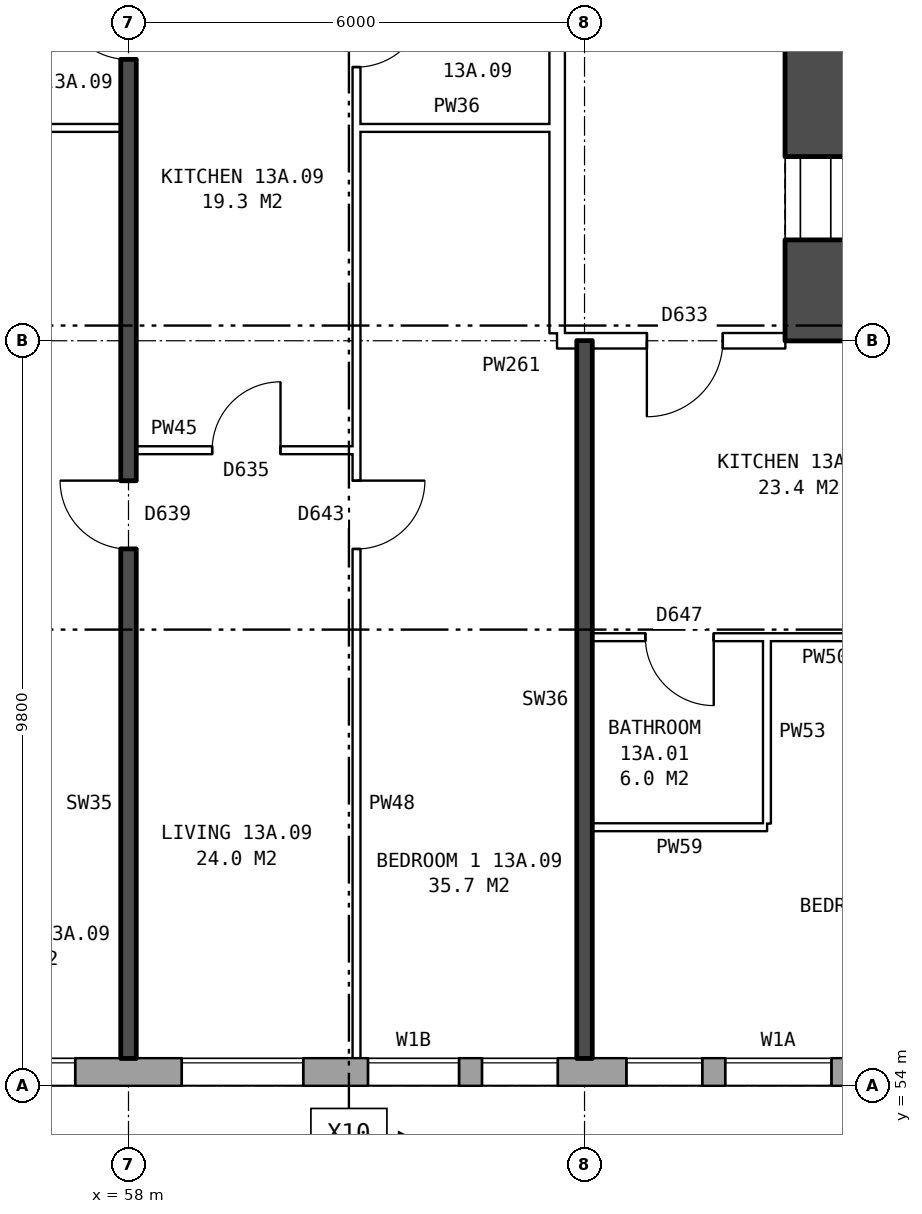
"""IFC4 building model, lengths in metres.
Left out: names, types, materials, properties, quantities, classifications, styles, units other than length and angle.
Written with IfcOpenShell. Run it as: python <this file> out.ifc"""

import sys

from ifc_helpers import new_model, si_unit, direction, frame, frame_2d, origin, place, context, subcontext, project, spatial, rectangle, extrude, element, fill, save


model = new_model("IFC4")
c1 = context("Model", 3, precision=1e-05, world=origin(), true_north=direction((0.0, 1.0)))
c2 = subcontext(c1, "Body", "Model", "MODEL_VIEW")
j1 = project(units=[si_unit("LENGTHUNIT", "METRE"), si_unit("PLANEANGLEUNIT", "RADIAN")], contexts=[c1])
p1 = place(None, origin())
s1 = spatial("IfcSite", under=j1, at=p1, CompositionType="ELEMENT")
p2 = place(p1, origin())
s2 = spatial("IfcBuilding", under=s1, at=p2, CompositionType="ELEMENT")
p3 = place(p2, frame((0.0, 0.0, 50.5)))
s3 = spatial("IfcBuildingStorey", under=s2, at=p3, CompositionType="ELEMENT", Elevation=50.5)
p4 = place(p3, frame((24.575, 54.18, 0.0), z_axis=(0.0, 0.0, 1.0), x_axis=(1.0, 0.0, 0.0)))
e1 = element("IfcWall", 1, at=p4, inside=s3, PredefinedType="STANDARD", context=c2, shape_type="SweptSolid", body=[
    extrude(rectangle(XDim=48.351, YDim=0.36, at=frame_2d((24.175, 0.0))), origin(), (0.0, 0.0, 1.0), 2.85),
])
p5 = place(p4, frame((1.125, 0.0, 0.8)))
e2 = element("IfcOpeningElement", 2, at=p5, cuts=e1, PredefinedType="OPENING", context=c2, shape_type="SweptSolid", body=[
    extrude(rectangle(XDim=1.6, YDim=1.8, at=frame_2d((0.8, 0.9))), frame((0.0, 0.19, 0.0), z_axis=(0.0, -1.0, 0.0), x_axis=(1.0, 0.0, 0.0)), (0.0, 0.0, 1.0), 0.38),
])
p6 = place(p4, frame((4.125, 0.0, 0.8)))
e3 = element("IfcOpeningElement", 3, at=p6, cuts=e1, PredefinedType="OPENING", context=c2, shape_type="SweptSolid", body=[
    extrude(rectangle(XDim=1.6, YDim=1.8, at=frame_2d((0.8, 0.9))), frame((0.0, 0.19, 0.0), z_axis=(0.0, -1.0, 0.0), x_axis=(1.0, 0.0, 0.0)), (0.0, 0.0, 1.0), 0.38),
])
p7 = place(p4, frame((6.025, 0.0, 0.8)))
e4 = element("IfcOpeningElement", 4, at=p7, cuts=e1, PredefinedType="OPENING", context=c2, shape_type="SweptSolid", body=[
    extrude(rectangle(XDim=1.0, YDim=1.8, at=frame_2d((0.5, 0.9))), frame((0.0, 0.19, 0.0), z_axis=(0.0, -1.0, 0.0), x_axis=(1.0, 0.0, 0.0)), (0.0, 0.0, 1.0), 0.38),
])
p8 = place(p4, frame((9.775, 0.0, 0.8)))
e5 = element("IfcOpeningElement", 5, at=p8, cuts=e1, PredefinedType="OPENING", context=c2, shape_type="SweptSolid", body=[
    extrude(rectangle(XDim=1.0, YDim=0.9, at=frame_2d((0.5, 0.45))), frame((0.0, 0.19, 0.0), z_axis=(0.0, -1.0, 0.0), x_axis=(1.0, 0.0, 0.0)), (0.0, 0.0, 1.0), 0.38),
])
p9 = place(p4, frame((13.125, 0.0, 0.8)))
e6 = element("IfcOpeningElement", 6, at=p9, cuts=e1, PredefinedType="OPENING", context=c2, shape_type="SweptSolid", body=[
    extrude(rectangle(XDim=1.6, YDim=1.8, at=frame_2d((0.8, 0.9))), frame((0.0, 0.19, 0.0), z_axis=(0.0, -1.0, 0.0), x_axis=(1.0, 0.0, 0.0)), (0.0, 0.0, 1.0), 0.38),
])
p10 = place(p4, frame((16.125, 0.0, 0.8)))
e7 = element("IfcOpeningElement", 7, at=p10, cuts=e1, PredefinedType="OPENING", context=c2, shape_type="SweptSolid", body=[
    extrude(rectangle(XDim=1.6, YDim=1.8, at=frame_2d((0.8, 0.9))), frame((0.0, 0.19, 0.0), z_axis=(0.0, -1.0, 0.0), x_axis=(1.0, 0.0, 0.0)), (0.0, 0.0, 1.0), 0.38),
])
p11 = place(p4, frame((19.125, 0.0, 0.8)))
e8 = element("IfcOpeningElement", 8, at=p11, cuts=e1, PredefinedType="OPENING", context=c2, shape_type="SweptSolid", body=[
    extrude(rectangle(XDim=1.6, YDim=1.8, at=frame_2d((0.8, 0.9))), frame((0.0, 0.19, 0.0), z_axis=(0.0, -1.0, 0.0), x_axis=(1.0, 0.0, 0.0)), (0.0, 0.0, 1.0), 0.38),
])
p12 = place(p4, frame((22.125, 0.0, 0.8)))
e9 = element("IfcOpeningElement", 9, at=p12, cuts=e1, PredefinedType="OPENING", context=c2, shape_type="SweptSolid", body=[
    extrude(rectangle(XDim=1.6, YDim=1.8, at=frame_2d((0.8, 0.9))), frame((0.0, 0.19, 0.0), z_axis=(0.0, -1.0, 0.0), x_axis=(1.0, 0.0, 0.0)), (0.0, 0.0, 1.0), 0.38),
])
p13 = place(p4, frame((25.125, 0.0, 0.8)))
e10 = element("IfcOpeningElement", 10, at=p13, cuts=e1, PredefinedType="OPENING", context=c2, shape_type="SweptSolid", body=[
    extrude(rectangle(XDim=1.6, YDim=1.8, at=frame_2d((0.8, 0.9))), frame((0.0, 0.19, 0.0), z_axis=(0.0, -1.0, 0.0), x_axis=(1.0, 0.0, 0.0)), (0.0, 0.0, 1.0), 0.38),
])
p14 = place(p4, frame((28.125, 0.0, 0.8)))
e11 = element("IfcOpeningElement", 11, at=p14, cuts=e1, PredefinedType="OPENING", context=c2, shape_type="SweptSolid", body=[
    extrude(rectangle(XDim=1.6, YDim=1.8, at=frame_2d((0.8, 0.9))), frame((0.0, 0.19, 0.0), z_axis=(0.0, -1.0, 0.0), x_axis=(1.0, 0.0, 0.0)), (0.0, 0.0, 1.0), 0.38),
])
p15 = place(p4, frame((31.125, 0.0, 0.8)))
e12 = element("IfcOpeningElement", 12, at=p15, cuts=e1, PredefinedType="OPENING", context=c2, shape_type="SweptSolid", body=[
    extrude(rectangle(XDim=1.6, YDim=1.8, at=frame_2d((0.8, 0.9))), frame((0.0, 0.19, 0.0), z_axis=(0.0, -1.0, 0.0), x_axis=(1.0, 0.0, 0.0)), (0.0, 0.0, 1.0), 0.38),
])
p16 = place(p4, frame((34.125, 0.0, 0.8)))
e13 = element("IfcOpeningElement", 13, at=p16, cuts=e1, PredefinedType="OPENING", context=c2, shape_type="SweptSolid", body=[
    extrude(rectangle(XDim=1.6, YDim=1.8, at=frame_2d((0.8, 0.9))), frame((0.0, 0.19, 0.0), z_axis=(0.0, -1.0, 0.0), x_axis=(1.0, 0.0, 0.0)), (0.0, 0.0, 1.0), 0.38),
])
p17 = place(p4, frame((36.575, 0.0, 0.45)))
e14 = element("IfcOpeningElement", 14, at=p17, cuts=e1, PredefinedType="OPENING", context=c2, shape_type="SweptSolid", body=[
    extrude(rectangle(XDim=1.2, YDim=1.8, at=frame_2d((0.6, 0.9))), frame((0.0, 0.19, 0.0), z_axis=(0.0, -1.0, 0.0), x_axis=(1.0, 0.0, 0.0)), (0.0, 0.0, 1.0), 0.38),
])
p18 = place(p4, frame((39.975, 0.0, 1.7)))
e15 = element("IfcOpeningElement", 15, at=p18, cuts=e1, PredefinedType="OPENING", context=c2, shape_type="SweptSolid", body=[
    extrude(rectangle(XDim=1.0, YDim=0.9, at=frame_2d((0.5, 0.45))), frame((0.0, 0.19, 0.0), z_axis=(0.0, -1.0, 0.0), x_axis=(1.0, 0.0, 0.0)), (0.0, 0.0, 1.0), 0.38),
])
p19 = place(p4, frame((43.125, 0.0, 0.8)))
e16 = element("IfcOpeningElement", 16, at=p19, cuts=e1, PredefinedType="OPENING", context=c2, shape_type="SweptSolid", body=[
    extrude(rectangle(XDim=1.6, YDim=1.8, at=frame_2d((0.8, 0.9))), frame((0.0, 0.19, 0.0), z_axis=(0.0, -1.0, 0.0), x_axis=(1.0, 0.0, 0.0)), (0.0, 0.0, 1.0), 0.38),
])
p20 = place(p4, frame((46.125, 0.0, 0.8)))
e17 = element("IfcOpeningElement", 17, at=p20, cuts=e1, PredefinedType="OPENING", context=c2, shape_type="SweptSolid", body=[
    extrude(rectangle(XDim=1.6, YDim=1.8, at=frame_2d((0.8, 0.9))), frame((0.0, 0.19, 0.0), z_axis=(0.0, -1.0, 0.0), x_axis=(1.0, 0.0, 0.0)), (0.0, 0.0, 1.0), 0.38),
])
p21 = place(p4, frame((7.325, 0.0, 1.7)))
e18 = element("IfcOpeningElement", 18, at=p21, cuts=e1, PredefinedType="OPENING", context=c2, shape_type="SweptSolid", body=[
    extrude(rectangle(XDim=1.0, YDim=0.9, at=frame_2d((0.5, 0.45))), frame((0.0, 0.19, 0.0), z_axis=(0.0, -1.0, 0.0), x_axis=(1.0, 0.0, 0.0)), (0.0, 0.0, 1.0), 0.38),
])
p22 = place(p4, frame((11.075, 0.0, 0.8)))
e19 = element("IfcOpeningElement", 19, at=p22, cuts=e1, PredefinedType="OPENING", context=c2, shape_type="SweptSolid", body=[
    extrude(rectangle(XDim=1.0, YDim=1.8, at=frame_2d((0.5, 0.9))), frame((0.0, 0.19, 0.0), z_axis=(0.0, -1.0, 0.0), x_axis=(1.0, 0.0, 0.0)), (0.0, 0.0, 1.0), 0.38),
])
p23 = place(p4, frame((38.075, 0.0, 0.45)))
e20 = element("IfcOpeningElement", 20, at=p23, cuts=e1, PredefinedType="OPENING", context=c2, shape_type="SweptSolid", body=[
    extrude(rectangle(XDim=1.0, YDim=0.9, at=frame_2d((0.5, 0.45))), frame((0.0, 0.19, 0.0), z_axis=(0.0, -1.0, 0.0), x_axis=(1.0, 0.0, 0.0)), (0.0, 0.0, 1.0), 0.38),
])
p24 = place(p4, frame((41.275, 0.0, 0.8)))
e21 = element("IfcOpeningElement", 21, at=p24, cuts=e1, PredefinedType="OPENING", context=c2, shape_type="SweptSolid", body=[
    extrude(rectangle(XDim=1.4, YDim=1.8, at=frame_2d((0.7, 0.9))), frame((0.0, 0.19, 0.0), z_axis=(0.0, -1.0, 0.0), x_axis=(1.0, 0.0, 0.0)), (0.0, 0.0, 1.0), 0.38),
])
p25 = place(p3, frame((67.04, 64.6, 0.0), z_axis=(0.0, 0.0, 1.0), x_axis=(0.0, 1.0, 0.0)))
e22 = element("IfcWall", 22, at=p25, inside=s3, PredefinedType="SHEAR", context=c2, shape_type="SweptSolid", body=[
    extrude(rectangle(XDim=10.8, YDim=0.8, at=frame_2d((5.4, 0.0))), origin(), (0.0, 0.0, 1.0), 2.85),
])
p26 = place(p25, frame((0.525, 0.0, 0.0)))
e23 = element("IfcOpeningElement", 23, at=p26, cuts=e22, PredefinedType="OPENING", context=c2, shape_type="SweptSolid", body=[
    extrude(rectangle(XDim=1.1, YDim=2.1, at=frame_2d((0.55, 1.05))), frame((0.0, 0.41, 0.0), z_axis=(0.0, -1.0, 0.0), x_axis=(1.0, 0.0, 0.0)), (0.0, 0.0, 1.0), 0.82),
])
p27 = place(p25, frame((9.1, 0.0, 0.0)))
e24 = element("IfcOpeningElement", 24, at=p27, cuts=e22, PredefinedType="OPENING", context=c2, shape_type="SweptSolid", body=[
    extrude(rectangle(XDim=1.1, YDim=2.1, at=frame_2d((0.55, 1.05))), frame((0.0, 0.41, 0.0), z_axis=(0.0, -1.0, 0.0), x_axis=(1.0, 0.0, 0.0)), (0.0, 0.0, 1.0), 0.82),
])
p28 = place(p3, frame((66.64, 64.2, 0.0), z_axis=(0.0, 0.0, 1.0), x_axis=(1.0, 0.0, 0.0)))
e25 = element("IfcWall", 25, at=p28, inside=s3, PredefinedType="SHEAR", context=c2, shape_type="SweptSolid", body=[
    extrude(rectangle(XDim=9.0, YDim=0.8, at=frame_2d((4.5, 0.0))), origin(), (0.0, 0.0, 1.0), 2.85),
])
p29 = place(p3, frame((63.64, 63.9, 0.0), z_axis=(0.0, 0.0, 1.0), x_axis=(0.0, 1.0, 0.0)))
e26 = element("IfcWall", 26, at=p29, inside=s3, PredefinedType="PARTITIONING", context=c2, shape_type="SweptSolid", body=[
    extrude(rectangle(XDim=12.2, YDim=0.2, at=frame_2d((6.1, 0.0))), origin(), (0.0, 0.0, 1.0), 2.85),
])
p30 = place(p29, frame((5.1, 0.0, 0.0)))
e27 = element("IfcOpeningElement", 27, at=p30, cuts=e26, PredefinedType="OPENING", context=c2, shape_type="SweptSolid", body=[
    extrude(rectangle(XDim=2.0, YDim=2.1, at=frame_2d((1.0, 1.05))), frame((0.0, 0.11, 0.0), z_axis=(0.0, -1.0, 0.0), x_axis=(1.0, 0.0, 0.0)), (0.0, 0.0, 1.0), 0.22),
])
p31 = place(p3, frame((64.1, 57.4, 0.0), z_axis=(0.0, 0.0, 1.0), x_axis=(1.0, 0.0, 0.0)))
e28 = element("IfcWall", 28, at=p31, inside=s3, PredefinedType="PARTITIONING", context=c2, shape_type="SweptSolid", body=[
    extrude(rectangle(XDim=2.3, YDim=0.1, at=frame_2d((1.15, 0.0))), origin(), (0.0, 0.0, 1.0), 2.85),
])
p32 = place(p3, frame((64.1, 59.9, 0.0), z_axis=(0.0, 0.0, 1.0), x_axis=(1.0, 0.0, 0.0)))
e29 = element("IfcWall", 29, at=p32, inside=s3, PredefinedType="PARTITIONING", context=c2, shape_type="SweptSolid", body=[
    extrude(rectangle(XDim=5.8, YDim=0.1, at=frame_2d((2.9, 0.0))), origin(), (0.0, 0.0, 1.0), 2.85),
])
p33 = place(p32, frame((3.6, 0.0, 0.0)))
e30 = element("IfcOpeningElement", 30, at=p33, cuts=e29, PredefinedType="OPENING", context=c2, shape_type="SweptSolid", body=[
    extrude(rectangle(XDim=0.9, YDim=2.1, at=frame_2d((0.45, 1.05))), frame((0.0, 0.06, 0.0), z_axis=(0.0, -1.0, 0.0), x_axis=(1.0, 0.0, 0.0)), (0.0, 0.0, 1.0), 0.12),
])
p34 = place(p32, frame((0.7, 0.0, 0.0)))
e31 = element("IfcOpeningElement", 31, at=p34, cuts=e29, PredefinedType="OPENING", context=c2, shape_type="SweptSolid", body=[
    extrude(rectangle(XDim=0.9, YDim=2.1, at=frame_2d((0.45, 1.05))), frame((0.0, 0.06, 0.0), z_axis=(0.0, -1.0, 0.0), x_axis=(1.0, 0.0, 0.0)), (0.0, 0.0, 1.0), 0.12),
])
p35 = place(p3, frame((58.1, 62.36, 0.0), z_axis=(0.0, 0.0, 1.0), x_axis=(1.0, 0.0, 0.0)))
e32 = element("IfcWall", 32, at=p35, inside=s3, PredefinedType="PARTITIONING", context=c2, shape_type="SweptSolid", body=[
    extrude(rectangle(XDim=2.9, YDim=0.1, at=frame_2d((1.45, 0.0))), origin(), (0.0, 0.0, 1.0), 2.85),
])
p36 = place(p35, frame((1.0, 0.0, 0.0)))
e33 = element("IfcOpeningElement", 33, at=p36, cuts=e32, PredefinedType="OPENING", context=c2, shape_type="SweptSolid", body=[
    extrude(rectangle(XDim=0.9, YDim=2.1, at=frame_2d((0.45, 1.05))), frame((0.0, 0.06, 0.0), z_axis=(0.0, -1.0, 0.0), x_axis=(1.0, 0.0, 0.0)), (0.0, 0.0, 1.0), 0.12),
])
p37 = place(p3, frame((63.64, 63.8, 0.0), z_axis=(0.0, 0.0, 1.0), x_axis=(1.0, 0.0, 0.0)))
e34 = element("IfcWall", 34, at=p37, inside=s3, PredefinedType="PARTITIONING", context=c2, shape_type="SweptSolid", body=[
    extrude(rectangle(XDim=3.0, YDim=0.2, at=frame_2d((1.5, 0.0))), origin(), (0.0, 0.0, 1.0), 2.85),
])
p38 = place(p37, frame((1.18, 0.0, 0.0)))
e35 = element("IfcOpeningElement", 35, at=p38, cuts=e34, PredefinedType="OPENING", context=c2, shape_type="SweptSolid", body=[
    extrude(rectangle(XDim=1.0, YDim=2.1, at=frame_2d((0.5, 1.05))), frame((0.0, 0.11, 0.0), z_axis=(0.0, -1.0, 0.0), x_axis=(1.0, 0.0, 0.0)), (0.0, 0.0, 1.0), 0.22),
])
p39 = place(p3, frame((52.1, 66.6, 0.0), z_axis=(0.0, 0.0, 1.0), x_axis=(1.0, 0.0, 0.0)))
e36 = element("IfcWall", 36, at=p39, inside=s3, PredefinedType="PARTITIONING", context=c2, shape_type="SweptSolid", body=[
    extrude(rectangle(XDim=5.8, YDim=0.1, at=frame_2d((2.9, 0.0))), origin(), (0.0, 0.0, 1.0), 2.85),
])
p40 = place(p3, frame((61.0, 66.6, 0.0), z_axis=(0.0, 0.0, 1.0), x_axis=(1.0, 0.0, 0.0)))
e37 = element("IfcWall", 37, at=p40, inside=s3, PredefinedType="PARTITIONING", context=c2, shape_type="SweptSolid", body=[
    extrude(rectangle(XDim=2.64, YDim=0.1, at=frame_2d((1.32, 0.0))), origin(), (0.0, 0.0, 1.0), 2.85),
])
p41 = place(p3, frame((58.0, 54.36, 0.0), z_axis=(0.0, 0.0, 1.0), x_axis=(0.0, 1.0, 0.0)))
e38 = element("IfcWall", 38, at=p41, inside=s3, PredefinedType="SOLIDWALL", context=c2, shape_type="SweptSolid", body=[
    extrude(rectangle(XDim=14.44, YDim=0.2, at=frame_2d((7.22, 0.0))), origin(), (0.0, 0.0, 1.0), 2.85),
])
p42 = place(p41, frame((6.7, 0.0, 0.0)))
e39 = element("IfcOpeningElement", 39, at=p42, cuts=e38, PredefinedType="OPENING", context=c2, shape_type="SweptSolid", body=[
    extrude(rectangle(XDim=0.9, YDim=2.1, at=frame_2d((0.45, 1.05))), frame((0.0, 0.11, 0.0), z_axis=(0.0, -1.0, 0.0), x_axis=(1.0, 0.0, 0.0)), (0.0, 0.0, 1.0), 0.22),
])
p43 = place(p41, frame((13.14, 0.0, 0.0)))
e40 = element("IfcOpeningElement", 40, at=p43, cuts=e38, PredefinedType="OPENING", context=c2, shape_type="SweptSolid", body=[
    extrude(rectangle(XDim=0.9, YDim=2.1, at=frame_2d((0.45, 1.05))), frame((0.0, 0.11, 0.0), z_axis=(0.0, -1.0, 0.0), x_axis=(1.0, 0.0, 0.0)), (0.0, 0.0, 1.0), 0.22),
])
p44 = place(p3, frame((61.0, 54.36, 0.0), z_axis=(0.0, 0.0, 1.0), x_axis=(0.0, 1.0, 0.0)))
e41 = element("IfcWall", 41, at=p44, inside=s3, PredefinedType="PARTITIONING", context=c2, shape_type="SweptSolid", body=[
    extrude(rectangle(XDim=14.34, YDim=0.1, at=frame_2d((7.17, 0.0))), origin(), (0.0, 0.0, 1.0), 2.85),
])
p45 = place(p44, frame((6.7, 0.0, 0.0)))
e42 = element("IfcOpeningElement", 42, at=p45, cuts=e41, PredefinedType="OPENING", context=c2, shape_type="SweptSolid", body=[
    extrude(rectangle(XDim=0.9, YDim=2.1, at=frame_2d((0.45, 1.05))), frame((0.0, 0.06, 0.0), z_axis=(0.0, -1.0, 0.0), x_axis=(1.0, 0.0, 0.0)), (0.0, 0.0, 1.0), 0.12),
])
p46 = place(p44, frame((13.04, 0.0, 0.0)))
e43 = element("IfcOpeningElement", 43, at=p46, cuts=e41, PredefinedType="OPENING", context=c2, shape_type="SweptSolid", body=[
    extrude(rectangle(XDim=0.9, YDim=2.1, at=frame_2d((0.45, 1.05))), frame((0.0, 0.06, 0.0), z_axis=(0.0, -1.0, 0.0), x_axis=(1.0, 0.0, 0.0)), (0.0, 0.0, 1.0), 0.12),
])
p47 = place(p3, frame((64.0, 54.36, 0.0), z_axis=(0.0, 0.0, 1.0), x_axis=(0.0, 1.0, 0.0)))
e44 = element("IfcWall", 44, at=p47, inside=s3, PredefinedType="SOLIDWALL", context=c2, shape_type="SweptSolid", body=[
    extrude(rectangle(XDim=9.44, YDim=0.2, at=frame_2d((4.72, 0.0))), origin(), (0.0, 0.0, 1.0), 2.85),
])
p48 = place(p3, frame((66.4, 57.45, 0.0), z_axis=(0.0, 0.0, 1.0), x_axis=(0.0, 1.0, 0.0)))
e45 = element("IfcWall", 45, at=p48, inside=s3, PredefinedType="PARTITIONING", context=c2, shape_type="SweptSolid", body=[
    extrude(rectangle(XDim=2.4, YDim=0.1, at=frame_2d((1.2, 0.0))), origin(), (0.0, 0.0, 1.0), 2.85),
])
p49 = place(p15, origin())
e46 = element("IfcWindow", 46, at=p49, inside=s3, PartitioningType="SINGLE_PANEL", PredefinedType="WINDOW", context=c2, shape_type="SweptSolid", body=[
    extrude(rectangle(XDim=1.6, YDim=1.8, at=frame_2d((0.8, 0.9))), frame((0.0, 0.15, 0.0), z_axis=(0.0, -1.0, 0.0), x_axis=(1.0, 0.0, 0.0)), (0.0, 0.0, 1.0), 0.06),
])
fill(e12, e46)
p50 = place(p16, origin())
e47 = element("IfcWindow", 47, at=p50, inside=s3, PartitioningType="SINGLE_PANEL", PredefinedType="WINDOW", context=c2, shape_type="SweptSolid", body=[
    extrude(rectangle(XDim=1.6, YDim=1.8, at=frame_2d((0.8, 0.9))), frame((0.0, 0.15, 0.0), z_axis=(0.0, -1.0, 0.0), x_axis=(1.0, 0.0, 0.0)), (0.0, 0.0, 1.0), 0.06),
])
fill(e13, e47)
p51 = place(p17, origin())
e48 = element("IfcWindow", 48, at=p51, inside=s3, PartitioningType="SINGLE_PANEL", PredefinedType="WINDOW", context=c2, shape_type="SweptSolid", body=[
    extrude(rectangle(XDim=1.2, YDim=1.8, at=frame_2d((0.6, 0.9))), frame((0.0, 0.15, 0.0), z_axis=(0.0, -1.0, 0.0), x_axis=(1.0, 0.0, 0.0)), (0.0, 0.0, 1.0), 0.06),
])
fill(e14, e48)
p52 = place(p18, origin())
e49 = element("IfcWindow", 49, at=p52, inside=s3, PartitioningType="SINGLE_PANEL", PredefinedType="WINDOW", context=c2, shape_type="SweptSolid", body=[
    extrude(rectangle(XDim=1.0, YDim=0.9, at=frame_2d((0.5, 0.45))), frame((0.0, 0.15, 0.0), z_axis=(0.0, -1.0, 0.0), x_axis=(1.0, 0.0, 0.0)), (0.0, 0.0, 1.0), 0.06),
])
fill(e15, e49)
p53 = place(p26, origin())
e50 = element("IfcDoor", 50, at=p53, inside=s3, OperationType="DOUBLE_DOOR_SLIDING", PredefinedType="DOOR", context=c2, shape_type="SweptSolid", body=[
    extrude(rectangle(XDim=1.1, YDim=2.1, at=frame_2d((0.55, 1.05))), frame((0.0, -0.335, 0.0), z_axis=(0.0, -1.0, 0.0), x_axis=(1.0, 0.0, 0.0)), (0.0, 0.0, 1.0), 0.05),
])
fill(e23, e50)
p54 = place(p38, frame((1.0, 0.0, 0.0), z_axis=(0.0, 0.0, 1.0), x_axis=(-1.0, 0.0, 0.0)))
e51 = element("IfcDoor", 51, at=p54, inside=s3, OperationType="SINGLE_SWING_RIGHT", PredefinedType="DOOR", context=c2, shape_type="SweptSolid", body=[
    extrude(rectangle(XDim=1.0, YDim=2.1, at=frame_2d((0.5, 1.05))), frame((0.0, 0.025, 0.0), z_axis=(0.0, -1.0, 0.0), x_axis=(1.0, 0.0, 0.0)), (0.0, 0.0, 1.0), 0.05),
])
fill(e35, e51)
p55 = place(p34, frame((0.9, 0.0, 0.0), z_axis=(0.0, 0.0, 1.0), x_axis=(-1.0, 0.0, 0.0)))
e52 = element("IfcDoor", 52, at=p55, inside=s3, OperationType="SINGLE_SWING_LEFT", PredefinedType="DOOR", context=c2, shape_type="SweptSolid", body=[
    extrude(rectangle(XDim=0.9, YDim=2.1, at=frame_2d((0.45, 1.05))), frame((0.0, 0.025, 0.0), z_axis=(0.0, -1.0, 0.0), x_axis=(1.0, 0.0, 0.0)), (0.0, 0.0, 1.0), 0.05),
])
fill(e31, e52)
p56 = place(p45, frame((0.9, 0.0, 0.0), z_axis=(0.0, 0.0, 1.0), x_axis=(-1.0, 0.0, 0.0)))
e53 = element("IfcDoor", 53, at=p56, inside=s3, OperationType="SINGLE_SWING_LEFT", PredefinedType="DOOR", context=c2, shape_type="SweptSolid", body=[
    extrude(rectangle(XDim=0.9, YDim=2.1, at=frame_2d((0.45, 1.05))), frame((0.0, 0.025, 0.0), z_axis=(0.0, -1.0, 0.0), x_axis=(1.0, 0.0, 0.0)), (0.0, 0.0, 1.0), 0.05),
])
fill(e42, e53)
p57 = place(p42, origin())
e54 = element("IfcDoor", 54, at=p57, inside=s3, OperationType="SINGLE_SWING_RIGHT", PredefinedType="DOOR", context=c2, shape_type="SweptSolid", body=[
    extrude(rectangle(XDim=0.9, YDim=2.1, at=frame_2d((0.45, 1.05))), frame((0.0, 0.025, 0.0), z_axis=(0.0, -1.0, 0.0), x_axis=(1.0, 0.0, 0.0)), (0.0, 0.0, 1.0), 0.05),
])
fill(e39, e54)
p58 = place(p36, origin())
e55 = element("IfcDoor", 55, at=p58, inside=s3, OperationType="SINGLE_SWING_RIGHT", PredefinedType="DOOR", context=c2, shape_type="SweptSolid", body=[
    extrude(rectangle(XDim=0.9, YDim=2.1, at=frame_2d((0.45, 1.05))), frame((0.0, 0.025, 0.0), z_axis=(0.0, -1.0, 0.0), x_axis=(1.0, 0.0, 0.0)), (0.0, 0.0, 1.0), 0.05),
])
fill(e33, e55)
p59 = place(p46, frame((0.9, 0.0, 0.0), z_axis=(0.0, 0.0, 1.0), x_axis=(-1.0, 0.0, 0.0)))
e56 = element("IfcDoor", 56, at=p59, inside=s3, OperationType="SINGLE_SWING_LEFT", PredefinedType="DOOR", context=c2, shape_type="SweptSolid", body=[
    extrude(rectangle(XDim=0.9, YDim=2.1, at=frame_2d((0.45, 1.05))), frame((0.0, 0.025, 0.0), z_axis=(0.0, -1.0, 0.0), x_axis=(1.0, 0.0, 0.0)), (0.0, 0.0, 1.0), 0.05),
])
fill(e43, e56)
p60 = place(p43, origin())
e57 = element("IfcDoor", 57, at=p60, inside=s3, OperationType="SINGLE_SWING_RIGHT", PredefinedType="DOOR", context=c2, shape_type="SweptSolid", body=[
    extrude(rectangle(XDim=0.9, YDim=2.1, at=frame_2d((0.45, 1.05))), frame((0.0, 0.025, 0.0), z_axis=(0.0, -1.0, 0.0), x_axis=(1.0, 0.0, 0.0)), (0.0, 0.0, 1.0), 0.05),
])
fill(e40, e57)
p61 = place(p23, origin())
e58 = element("IfcWindow", 58, at=p61, inside=s3, PartitioningType="SINGLE_PANEL", PredefinedType="WINDOW", context=c2, shape_type="SweptSolid", body=[
    extrude(rectangle(XDim=1.0, YDim=0.9, at=frame_2d((0.5, 0.45))), frame((0.0, 0.15, 0.0), z_axis=(0.0, -1.0, 0.0), x_axis=(1.0, 0.0, 0.0)), (0.0, 0.0, 1.0), 0.06),
])
fill(e20, e58)
p62 = place(p24, origin())
e59 = element("IfcWindow", 59, at=p62, inside=s3, PartitioningType="SINGLE_PANEL", PredefinedType="WINDOW", context=c2, shape_type="SweptSolid", body=[
    extrude(rectangle(XDim=1.4, YDim=1.8, at=frame_2d((0.7, 0.9))), frame((0.0, 0.15, 0.0), z_axis=(0.0, -1.0, 0.0), x_axis=(1.0, 0.0, 0.0)), (0.0, 0.0, 1.0), 0.06),
])
fill(e21, e59)
save(model, sys.argv[1])
